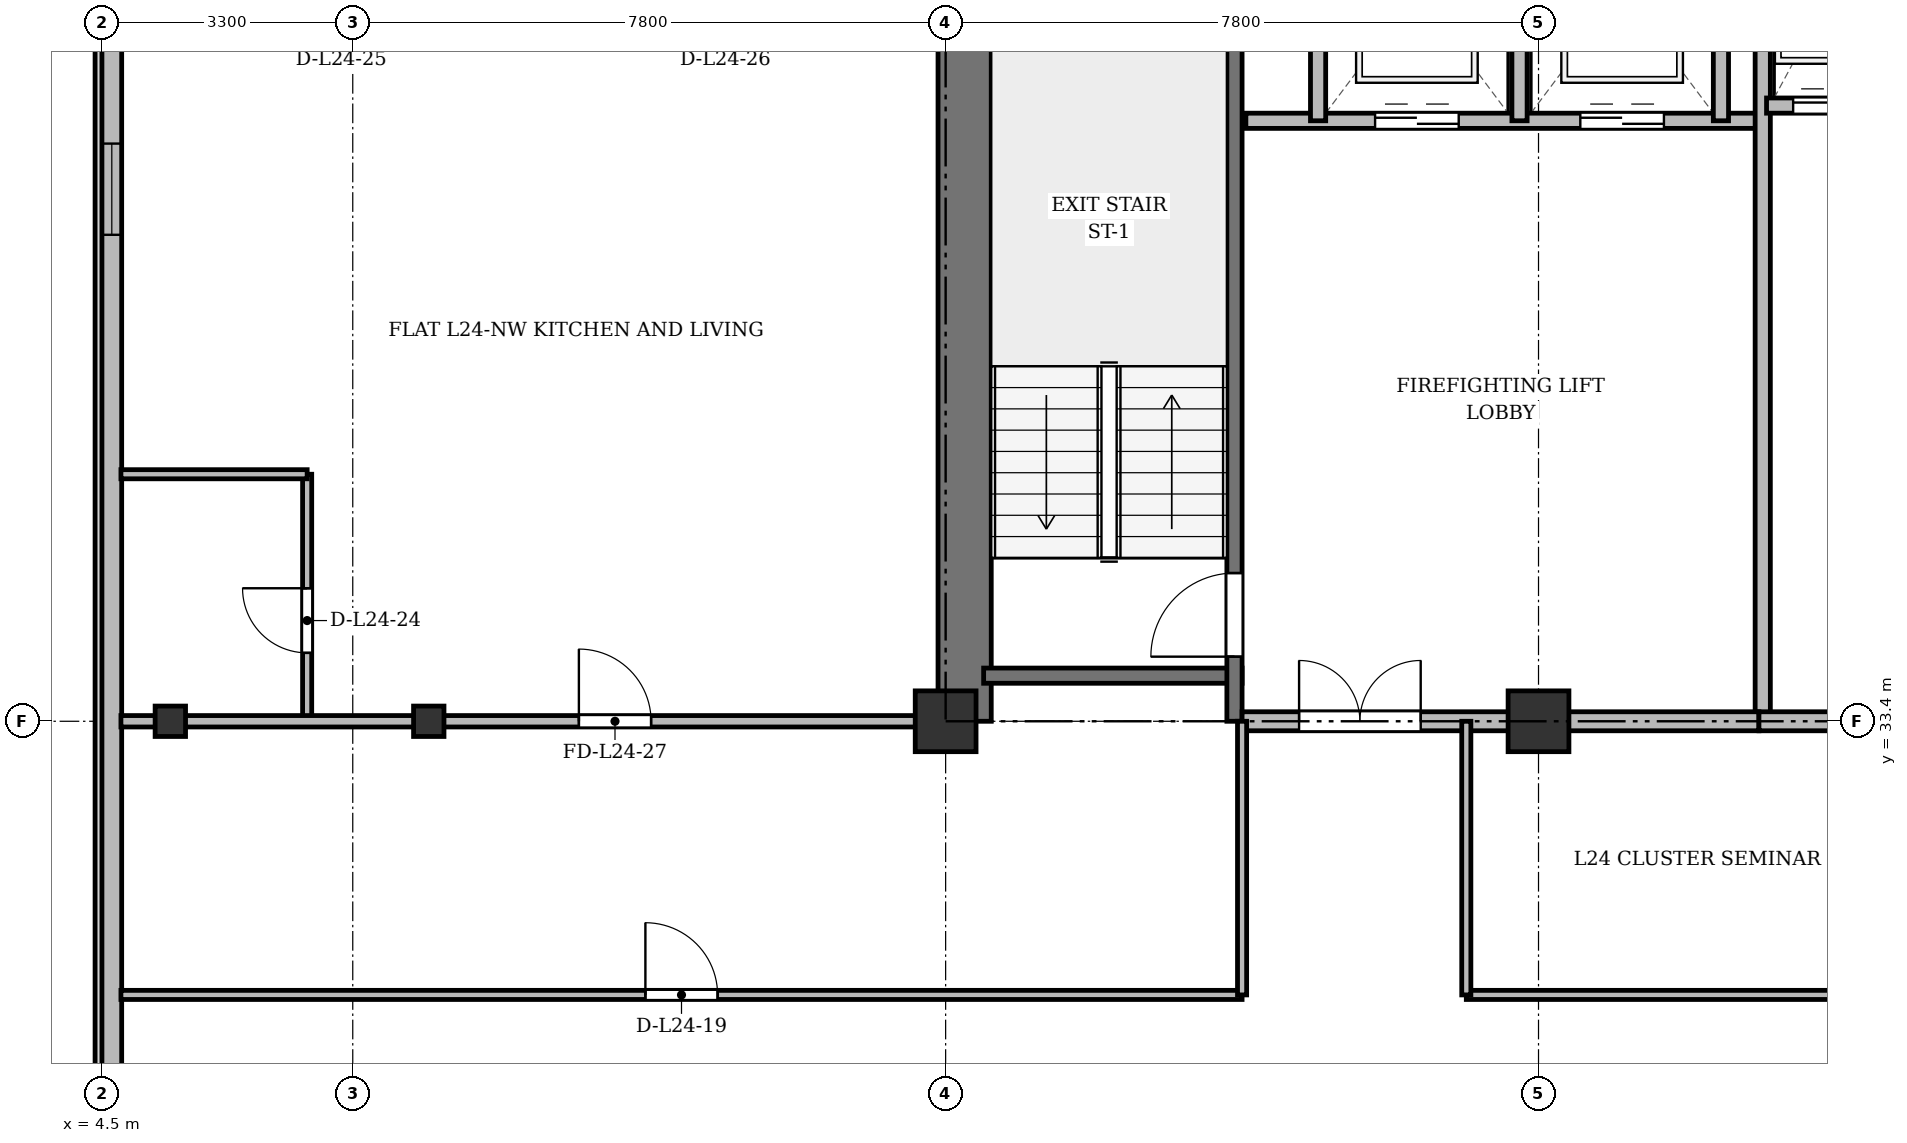
"""IFC4 building model, lengths in metres.
Left out: names, types, materials, properties, quantities, classifications, styles, units other than length and angle.
Written with IfcOpenShell. Run it as: python <this file> out.ifc"""

import sys

from ifc_helpers import new_model, si_unit, direction, frame, frame_2d, origin, origin_2d, place, context, subcontext, project, spatial, rectangle, i_section, extrude, source, transform, mapped, element, fill, save


model = new_model("IFC4")
c1 = context("Model", 3, precision=1e-05, world=origin(), true_north=direction((0.0, 1.0)))
c2 = subcontext(c1, "Body", "Model", "MODEL_VIEW")
j1 = project(units=[si_unit("LENGTHUNIT", "METRE"), si_unit("PLANEANGLEUNIT", "RADIAN")], contexts=[c1])
p1 = place(None, origin())
s1 = spatial("IfcSite", under=j1, at=p1, CompositionType="ELEMENT")
p2 = place(p1, origin())
s2 = spatial("IfcBuilding", under=s1, at=p2, CompositionType="ELEMENT")
p3 = place(p2, frame((0.0, 0.0, 96.1)))
s3 = spatial("IfcBuildingStorey", under=s2, at=p3, CompositionType="ELEMENT", Elevation=96.1)
m1 = source(origin(), c2, "Body", "SweptSolid", [
    extrude(i_section(OverallWidth=0.4, OverallDepth=0.4, WebThickness=0.022, FlangeThickness=0.035, at=origin_2d()), origin(), (0.0, 0.0, 1.0), 3.6),
])
for number, where, z_axis, x_axis in (
    (1, (5.4, 33.4, 0.0), (0.0, 0.0, 1.0), (1.0, 0.0, 0.0)),
    (2, (8.8, 33.4, 0.0), (0.0, 0.0, 1.0), (1.0, 0.0, 0.0)),
):
    element("IfcColumn", number, at=place(p3, frame(where, z_axis=z_axis, x_axis=x_axis)), inside=s3, PredefinedType="COLUMN", context=c2, shape_type="MappedRepresentation", body=[
        mapped(m1, transform((0.0, 0.0, 0.0), x_axis=(1.0, 0.0, 0.0), y_axis=(0.0, 1.0, 0.0), z_axis=(0.0, 0.0, 1.0), scale=1.0)),
    ])
m2 = source(origin(), c2, "Body", "SweptSolid", [
    extrude(rectangle(XDim=0.8, YDim=0.8, at=origin_2d()), origin(), (0.0, 0.0, 1.0), 3.6),
])
for number, where, z_axis, x_axis in (
    (3, (15.6, 33.4, 0.0), (0.0, 0.0, 1.0), (1.0, 0.0, 0.0)),
    (4, (23.4, 33.4, 0.0), (0.0, 0.0, 1.0), (1.0, 0.0, 0.0)),
):
    element("IfcColumn", number, at=place(p3, frame(where, z_axis=z_axis, x_axis=x_axis)), inside=s3, PredefinedType="COLUMN", context=c2, shape_type="MappedRepresentation", body=[
        mapped(m2, transform((0.0, 0.0, 0.0), x_axis=(1.0, 0.0, 0.0), y_axis=(0.0, 1.0, 0.0), z_axis=(0.0, 0.0, 1.0), scale=1.0)),
    ])
p4 = place(p3, frame((4.63, 5.9, 0.0), z_axis=(0.0, 0.0, 1.0), x_axis=(0.0, 1.0, 0.0)))
e5 = element("IfcWall", 5, at=p4, inside=s3, PredefinedType="SOLIDWALL", context=c2, shape_type="SweptSolid", body=[
    extrude(rectangle(XDim=39.6, YDim=0.26, at=frame_2d((19.8, 0.0))), origin(), (0.0, 0.0, 1.0), 3.34),
])
p5 = place(p4, frame((1.45, 0.0, 0.92)))
e6 = element("IfcOpeningElement", 6, at=p5, cuts=e5, PredefinedType="OPENING", context=c2, shape_type="SweptSolid", body=[
    extrude(rectangle(XDim=1.2, YDim=1.65, at=frame_2d((0.6, 0.825))), frame((0.0, 0.14, 0.0), z_axis=(0.0, -1.0, 0.0), x_axis=(1.0, 0.0, 0.0)), (0.0, 0.0, 1.0), 0.28),
])
p6 = place(p4, frame((4.2, 0.0, 0.92)))
e7 = element("IfcOpeningElement", 7, at=p6, cuts=e5, PredefinedType="OPENING", context=c2, shape_type="SweptSolid", body=[
    extrude(rectangle(XDim=2.6, YDim=1.9, at=frame_2d((1.3, 0.95))), frame((0.0, 0.14, 0.0), z_axis=(0.0, -1.0, 0.0), x_axis=(1.0, 0.0, 0.0)), (0.0, 0.0, 1.0), 0.28),
])
p7 = place(p4, frame((8.4, 0.0, 0.92)))
e8 = element("IfcOpeningElement", 8, at=p7, cuts=e5, PredefinedType="OPENING", context=c2, shape_type="SweptSolid", body=[
    extrude(rectangle(XDim=2.6, YDim=1.9, at=frame_2d((1.3, 0.95))), frame((0.0, 0.14, 0.0), z_axis=(0.0, -1.0, 0.0), x_axis=(1.0, 0.0, 0.0)), (0.0, 0.0, 1.0), 0.28),
])
p8 = place(p4, frame((33.9, 0.0, 0.92)))
e9 = element("IfcOpeningElement", 9, at=p8, cuts=e5, PredefinedType="OPENING", context=c2, shape_type="SweptSolid", body=[
    extrude(rectangle(XDim=1.2, YDim=1.65, at=frame_2d((0.6, 0.825))), frame((0.0, 0.14, 0.0), z_axis=(0.0, -1.0, 0.0), x_axis=(1.0, 0.0, 0.0)), (0.0, 0.0, 1.0), 0.28),
])
p9 = place(p4, frame((37.25, 0.0, 0.92)))
e10 = element("IfcOpeningElement", 10, at=p9, cuts=e5, PredefinedType="OPENING", context=c2, shape_type="SweptSolid", body=[
    extrude(rectangle(XDim=1.2, YDim=1.65, at=frame_2d((0.6, 0.825))), frame((0.0, 0.14, 0.0), z_axis=(0.0, -1.0, 0.0), x_axis=(1.0, 0.0, 0.0)), (0.0, 0.0, 1.0), 0.28),
])
p10 = place(p3, frame((15.85, 33.4, 0.0), z_axis=(0.0, 0.0, 1.0), x_axis=(0.0, 1.0, 0.0)))
e11 = element("IfcWall", 11, at=p10, inside=s3, PredefinedType="SHEAR", context=c2, shape_type="SweptSolid", body=[
    extrude(rectangle(XDim=11.7, YDim=0.7, at=frame_2d((5.85, 0.0))), origin(), (0.0, 0.0, 1.0), 3.34),
])
p11 = place(p3, frame((16.1, 34.0, 0.0), z_axis=(0.0, 0.0, 1.0), x_axis=(1.0, 0.0, 0.0)))
e12 = element("IfcWall", 12, at=p11, inside=s3, PredefinedType="SHEAR", context=c2, shape_type="SweptSolid", body=[
    extrude(rectangle(XDim=3.4, YDim=0.2, at=frame_2d((1.7, 0.0))), origin(), (0.0, 0.0, 1.0), 3.34),
])
p12 = place(p3, frame((19.4, 33.4, 0.0), z_axis=(0.0, 0.0, 1.0), x_axis=(0.0, 1.0, 0.0)))
e13 = element("IfcWall", 13, at=p12, inside=s3, PredefinedType="SHEAR", context=c2, shape_type="SweptSolid", body=[
    extrude(rectangle(XDim=11.1, YDim=0.2, at=frame_2d((5.55, 0.0))), origin(), (0.0, 0.0, 1.0), 3.34),
])
p13 = place(p12, frame((0.85, 0.0, 0.0)))
e14 = element("IfcOpeningElement", 14, at=p13, cuts=e13, PredefinedType="OPENING", context=c2, shape_type="SweptSolid", body=[
    extrude(rectangle(XDim=1.1, YDim=2.15, at=frame_2d((0.55, 1.075))), frame((0.0, 0.11, 0.0), z_axis=(0.0, -1.0, 0.0), x_axis=(1.0, 0.0, 0.0)), (0.0, 0.0, 1.0), 0.22),
])
p14 = place(p3, frame((19.55, 41.3, 0.0), z_axis=(0.0, 0.0, 1.0), x_axis=(1.0, 0.0, 0.0)))
e15 = element("IfcWall", 15, at=p14, inside=s3, PredefinedType="SOLIDWALL", context=c2, shape_type="SweptSolid", body=[
    extrude(rectangle(XDim=6.75, YDim=0.2, at=frame_2d((3.375, 0.0))), origin(), (0.0, 0.0, 1.0), 3.34),
])
p15 = place(p14, frame((1.7, 0.0, 0.0)))
e16 = element("IfcOpeningElement", 16, at=p15, cuts=e15, PredefinedType="OPENING", context=c2, shape_type="SweptSolid", body=[
    extrude(rectangle(XDim=1.1, YDim=2.15, at=frame_2d((0.55, 1.075))), frame((0.0, 0.11, 0.0), z_axis=(0.0, -1.0, 0.0), x_axis=(1.0, 0.0, 0.0)), (0.0, 0.0, 1.0), 0.22),
])
p16 = place(p14, frame((4.4, 0.0, 0.0)))
e17 = element("IfcOpeningElement", 17, at=p16, cuts=e15, PredefinedType="OPENING", context=c2, shape_type="SweptSolid", body=[
    extrude(rectangle(XDim=1.1, YDim=2.15, at=frame_2d((0.55, 1.075))), frame((0.0, 0.11, 0.0), z_axis=(0.0, -1.0, 0.0), x_axis=(1.0, 0.0, 0.0)), (0.0, 0.0, 1.0), 0.22),
])
for number, where, z_axis, x_axis in (
    (18, (20.5, 41.3, 0.0), (0.0, 0.0, 1.0), (0.0, 1.0, 0.0)),
    (19, (23.15, 41.3, 0.0), (0.0, 0.0, 1.0), (0.0, 1.0, 0.0)),
    (20, (25.8, 41.3, 0.0), (0.0, 0.0, 1.0), (0.0, 1.0, 0.0)),
):
    element("IfcWall", number, at=place(p3, frame(where, z_axis=z_axis, x_axis=x_axis)), inside=s3, PredefinedType="SOLIDWALL", context=c2, shape_type="SweptSolid", body=[
        extrude(rectangle(XDim=3.4, YDim=0.2, at=frame_2d((1.7, 0.0))), origin(), (0.0, 0.0, 1.0), 3.34),
    ])
p17 = place(p3, frame((26.35, 33.4, 0.0), z_axis=(0.0, 0.0, 1.0), x_axis=(0.0, 1.0, 0.0)))
e21 = element("IfcWall", 21, at=p17, inside=s3, PredefinedType="SOLIDWALL", context=c2, shape_type="SweptSolid", body=[
    extrude(rectangle(XDim=11.3, YDim=0.2, at=frame_2d((5.65, 0.0))), origin(), (0.0, 0.0, 1.0), 2.752),
])
p18 = place(p3, frame((19.5, 33.4, 0.0), z_axis=(0.0, 0.0, 1.0), x_axis=(1.0, 0.0, 0.0)))
e22 = element("IfcWall", 22, at=p18, inside=s3, PredefinedType="PARTITIONING", context=c2, shape_type="SweptSolid", body=[
    extrude(rectangle(XDim=6.8, YDim=0.25, at=frame_2d((3.4, 0.0))), origin(), (0.0, 0.0, 1.0), 2.752),
])
p19 = place(p18, frame((0.75, 0.0, 0.0)))
e23 = element("IfcOpeningElement", 23, at=p19, cuts=e22, PredefinedType="OPENING", context=c2, shape_type="SweptSolid", body=[
    extrude(rectangle(XDim=1.6, YDim=2.2, at=frame_2d((0.8, 1.1))), frame((0.0, 0.135, 0.0), z_axis=(0.0, -1.0, 0.0), x_axis=(1.0, 0.0, 0.0)), (0.0, 0.0, 1.0), 0.27),
])
p20 = place(p3, frame((26.4, 41.5, 0.0), z_axis=(0.0, 0.0, 1.0), x_axis=(1.0, 0.0, 0.0)))
e24 = element("IfcWall", 24, at=p20, inside=s3, PredefinedType="SOLIDWALL", context=c2, shape_type="SweptSolid", body=[
    extrude(rectangle(XDim=6.95, YDim=0.2, at=frame_2d((3.475, 0.0))), origin(), (0.0, 0.0, 1.0), 3.34),
])
p21 = place(p20, frame((0.35, 0.0, 0.0)))
e25 = element("IfcOpeningElement", 25, at=p21, cuts=e24, PredefinedType="OPENING", context=c2, shape_type="SweptSolid", body=[
    extrude(rectangle(XDim=1.05, YDim=2.15, at=frame_2d((0.525, 1.075))), frame((0.0, 0.11, 0.0), z_axis=(0.0, -1.0, 0.0), x_axis=(1.0, 0.0, 0.0)), (0.0, 0.0, 1.0), 0.22),
])
p22 = place(p20, frame((2.05, 0.0, 0.0)))
e26 = element("IfcOpeningElement", 26, at=p22, cuts=e24, PredefinedType="OPENING", context=c2, shape_type="SweptSolid", body=[
    extrude(rectangle(XDim=1.05, YDim=2.15, at=frame_2d((0.525, 1.075))), frame((0.0, 0.11, 0.0), z_axis=(0.0, -1.0, 0.0), x_axis=(1.0, 0.0, 0.0)), (0.0, 0.0, 1.0), 0.22),
])
p23 = place(p20, frame((3.75, 0.0, 0.0)))
e27 = element("IfcOpeningElement", 27, at=p23, cuts=e24, PredefinedType="OPENING", context=c2, shape_type="SweptSolid", body=[
    extrude(rectangle(XDim=1.05, YDim=2.15, at=frame_2d((0.525, 1.075))), frame((0.0, 0.11, 0.0), z_axis=(0.0, -1.0, 0.0), x_axis=(1.0, 0.0, 0.0)), (0.0, 0.0, 1.0), 0.22),
])
p24 = place(p20, frame((5.45, 0.0, 0.0)))
e28 = element("IfcOpeningElement", 28, at=p24, cuts=e24, PredefinedType="OPENING", context=c2, shape_type="SweptSolid", body=[
    extrude(rectangle(XDim=1.05, YDim=2.15, at=frame_2d((0.525, 1.075))), frame((0.0, 0.11, 0.0), z_axis=(0.0, -1.0, 0.0), x_axis=(1.0, 0.0, 0.0)), (0.0, 0.0, 1.0), 0.22),
])
p25 = place(p3, frame((26.3, 33.4, 0.0), z_axis=(0.0, 0.0, 1.0), x_axis=(1.0, 0.0, 0.0)))
e29 = element("IfcWall", 29, at=p25, inside=s3, PredefinedType="PARTITIONING", context=c2, shape_type="SweptSolid", body=[
    extrude(rectangle(XDim=20.85, YDim=0.25, at=frame_2d((10.425, 0.0))), origin(), (0.0, 0.0, 1.0), 2.752),
])
p26 = place(p25, frame((9.2, 0.0, 0.0)))
e30 = element("IfcOpeningElement", 30, at=p26, cuts=e29, PredefinedType="OPENING", context=c2, shape_type="SweptSolid", body=[
    extrude(rectangle(XDim=1.6, YDim=2.2, at=frame_2d((0.8, 1.1))), frame((0.0, 0.135, 0.0), z_axis=(0.0, -1.0, 0.0), x_axis=(1.0, 0.0, 0.0)), (0.0, 0.0, 1.0), 0.27),
])
p27 = place(p3, frame((4.75, 29.8, 0.0), z_axis=(0.0, 0.0, 1.0), x_axis=(1.0, 0.0, 0.0)))
e31 = element("IfcWall", 31, at=p27, inside=s3, PredefinedType="PARTITIONING", context=c2, shape_type="SweptSolid", body=[
    extrude(rectangle(XDim=14.75, YDim=0.12, at=frame_2d((7.375, 0.0))), origin(), (0.0, 0.0, 1.0), 2.84),
])
p28 = place(p27, frame((6.9, 0.0, 0.0)))
e32 = element("IfcOpeningElement", 32, at=p28, cuts=e31, PredefinedType="OPENING", context=c2, shape_type="SweptSolid", body=[
    extrude(rectangle(XDim=0.95, YDim=2.15, at=frame_2d((0.475, 1.075))), frame((0.0, 0.07, 0.0), z_axis=(0.0, -1.0, 0.0), x_axis=(1.0, 0.0, 0.0)), (0.0, 0.0, 1.0), 0.14),
])
p29 = place(p3, frame((22.45, 29.8, 0.0), z_axis=(0.0, 0.0, 1.0), x_axis=(1.0, 0.0, 0.0)))
e33 = element("IfcWall", 33, at=p29, inside=s3, PredefinedType="PARTITIONING", context=c2, shape_type="SweptSolid", body=[
    extrude(rectangle(XDim=11.75, YDim=0.12, at=frame_2d((5.875, 0.0))), origin(), (0.0, 0.0, 1.0), 2.84),
])
p30 = place(p29, frame((4.944, 0.0, 0.0)))
e34 = element("IfcOpeningElement", 34, at=p30, cuts=e33, PredefinedType="OPENING", context=c2, shape_type="SweptSolid", body=[
    extrude(rectangle(XDim=0.95, YDim=2.15, at=frame_2d((0.475, 1.075))), frame((0.0, 0.07, 0.0), z_axis=(0.0, -1.0, 0.0), x_axis=(1.0, 0.0, 0.0)), (0.0, 0.0, 1.0), 0.14),
])
for number, where, z_axis, x_axis in (
    (35, (19.5, 29.8, 0.0), (0.0, 0.0, 1.0), (0.0, 1.0, 0.0)),
    (36, (22.45, 29.8, 0.0), (0.0, 0.0, 1.0), (0.0, 1.0, 0.0)),
):
    element("IfcWall", number, at=place(p3, frame(where, z_axis=z_axis, x_axis=x_axis)), inside=s3, PredefinedType="PARTITIONING", context=c2, shape_type="SweptSolid", body=[
        extrude(rectangle(XDim=3.6, YDim=0.12, at=frame_2d((1.8, 0.0))), origin(), (0.0, 0.0, 1.0), 2.752),
    ])
p31 = place(p3, frame((7.2, 33.4, 0.0), z_axis=(0.0, 0.0, 1.0), x_axis=(0.0, 1.0, 0.0)))
e37 = element("IfcWall", 37, at=p31, inside=s3, PredefinedType="PARTITIONING", context=c2, shape_type="SweptSolid", body=[
    extrude(rectangle(XDim=3.25, YDim=0.12, at=frame_2d((1.625, 0.0))), origin(), (0.0, 0.0, 1.0), 2.752),
])
p32 = place(p31, frame((0.9, 0.0, 0.0)))
e38 = element("IfcOpeningElement", 38, at=p32, cuts=e37, PredefinedType="OPENING", context=c2, shape_type="SweptSolid", body=[
    extrude(rectangle(XDim=0.85, YDim=2.1, at=frame_2d((0.425, 1.05))), frame((0.0, 0.07, 0.0), z_axis=(0.0, -1.0, 0.0), x_axis=(1.0, 0.0, 0.0)), (0.0, 0.0, 1.0), 0.14),
])
p33 = place(p3, frame((4.75, 36.65, 0.0), z_axis=(0.0, 0.0, 1.0), x_axis=(1.0, 0.0, 0.0)))
e39 = element("IfcWall", 39, at=p33, inside=s3, PredefinedType="PARTITIONING", context=c2, shape_type="SweptSolid", body=[
    extrude(rectangle(XDim=2.45, YDim=0.12, at=frame_2d((1.225, 0.0))), origin(), (0.0, 0.0, 1.0), 2.84),
])
p34 = place(p3, frame((4.75, 33.4, 0.0), z_axis=(0.0, 0.0, 1.0), x_axis=(1.0, 0.0, 0.0)))
e40 = element("IfcWall", 40, at=p34, inside=s3, PredefinedType="PARTITIONING", context=c2, shape_type="SweptSolid", body=[
    extrude(rectangle(XDim=10.85, YDim=0.15, at=frame_2d((5.425, 0.0))), origin(), (0.0, 0.0, 1.0), 2.752),
])
p35 = place(p34, frame((6.025, 0.0, 0.0)))
e41 = element("IfcOpeningElement", 41, at=p35, cuts=e40, PredefinedType="OPENING", context=c2, shape_type="SweptSolid", body=[
    extrude(rectangle(XDim=0.95, YDim=2.15, at=frame_2d((0.475, 1.075))), frame((0.0, 0.085, 0.0), z_axis=(0.0, -1.0, 0.0), x_axis=(1.0, 0.0, 0.0)), (0.0, 0.0, 1.0), 0.17),
])
m3 = source(origin(), c2, "Body", "SweptSolid", [
    extrude(rectangle(XDim=1.2, YDim=1.65, at=frame_2d((0.6, 0.825))), frame((0.0, 0.03, 0.0), z_axis=(0.0, -1.0, 0.0), x_axis=(1.0, 0.0, 0.0)), (0.0, 0.0, 1.0), 0.06),
])
p36 = place(p8, origin())
e42 = element("IfcWindow", 42, at=p36, inside=s3, PartitioningType="SINGLE_PANEL", PredefinedType="WINDOW", context=c2, shape_type="MappedRepresentation", body=[
    mapped(m3, transform((0.0, 0.0, 0.0), x_axis=(1.0, 0.0, 0.0), y_axis=(0.0, 1.0, 0.0), z_axis=(0.0, 0.0, 1.0), scale=1.0)),
])
fill(e9, e42)
m4 = source(origin(), c2, "Body", "SweptSolid", [
    extrude(rectangle(XDim=1.1, YDim=2.15, at=frame_2d((0.55, 1.075))), frame((0.0, 0.025, 0.0), z_axis=(0.0, -1.0, 0.0), x_axis=(1.0, 0.0, 0.0)), (0.0, 0.0, 1.0), 0.05),
])
p37 = place(p13, origin())
e43 = element("IfcDoor", 43, at=p37, inside=s3, OperationType="SINGLE_SWING_LEFT", PredefinedType="DOOR", context=c2, shape_type="MappedRepresentation", body=[
    mapped(m4, transform((0.0, 0.0, 0.0), x_axis=(1.0, 0.0, 0.0), y_axis=(0.0, 1.0, 0.0), z_axis=(0.0, 0.0, 1.0), scale=1.0)),
])
fill(e14, e43)
p38 = place(p15, origin())
e44 = element("IfcDoor", 44, at=p38, inside=s3, OperationType="DOUBLE_DOOR_SLIDING", PredefinedType="DOOR", context=c2, shape_type="MappedRepresentation", body=[
    mapped(m4, transform((0.0, 0.0, 0.0), x_axis=(1.0, 0.0, 0.0), y_axis=(0.0, 1.0, 0.0), z_axis=(0.0, 0.0, 1.0), scale=1.0)),
])
fill(e16, e44)
p39 = place(p16, origin())
e45 = element("IfcDoor", 45, at=p39, inside=s3, OperationType="DOUBLE_DOOR_SLIDING", PredefinedType="DOOR", context=c2, shape_type="MappedRepresentation", body=[
    mapped(m4, transform((0.0, 0.0, 0.0), x_axis=(1.0, 0.0, 0.0), y_axis=(0.0, 1.0, 0.0), z_axis=(0.0, 0.0, 1.0), scale=1.0)),
])
fill(e17, e45)
m5 = source(origin(), c2, "Body", "SweptSolid", [
    extrude(rectangle(XDim=1.6, YDim=2.2, at=frame_2d((0.8, 1.1))), frame((0.0, 0.025, 0.0), z_axis=(0.0, -1.0, 0.0), x_axis=(1.0, 0.0, 0.0)), (0.0, 0.0, 1.0), 0.05),
])
p40 = place(p19, origin())
e46 = element("IfcDoor", 46, at=p40, inside=s3, OperationType="DOUBLE_DOOR_SINGLE_SWING", PredefinedType="DOOR", context=c2, shape_type="MappedRepresentation", body=[
    mapped(m5, transform((0.0, 0.0, 0.0), x_axis=(1.0, 0.0, 0.0), y_axis=(0.0, 1.0, 0.0), z_axis=(0.0, 0.0, 1.0), scale=1.0)),
])
fill(e23, e46)
m6 = source(origin(), c2, "Body", "SweptSolid", [
    extrude(rectangle(XDim=1.05, YDim=2.15, at=frame_2d((0.525, 1.075))), frame((0.0, 0.025, 0.0), z_axis=(0.0, -1.0, 0.0), x_axis=(1.0, 0.0, 0.0)), (0.0, 0.0, 1.0), 0.05),
])
p41 = place(p21, origin())
e47 = element("IfcDoor", 47, at=p41, inside=s3, OperationType="DOUBLE_DOOR_SLIDING", PredefinedType="DOOR", context=c2, shape_type="MappedRepresentation", body=[
    mapped(m6, transform((0.0, 0.0, 0.0), x_axis=(1.0, 0.0, 0.0), y_axis=(0.0, 1.0, 0.0), z_axis=(0.0, 0.0, 1.0), scale=1.0)),
])
fill(e25, e47)
m7 = source(origin(), c2, "Body", "SweptSolid", [
    extrude(rectangle(XDim=0.95, YDim=2.15, at=frame_2d((0.475, 1.075))), frame((0.0, 0.025, 0.0), z_axis=(0.0, -1.0, 0.0), x_axis=(1.0, 0.0, 0.0)), (0.0, 0.0, 1.0), 0.05),
])
p42 = place(p28, origin())
e48 = element("IfcDoor", 48, at=p42, inside=s3, OperationType="SINGLE_SWING_LEFT", PredefinedType="DOOR", context=c2, shape_type="MappedRepresentation", body=[
    mapped(m7, transform((0.0, 0.0, 0.0), x_axis=(1.0, 0.0, 0.0), y_axis=(0.0, 1.0, 0.0), z_axis=(0.0, 0.0, 1.0), scale=1.0)),
])
fill(e32, e48)
m8 = source(origin(), c2, "Body", "SweptSolid", [
    extrude(rectangle(XDim=0.85, YDim=2.1, at=frame_2d((0.425, 1.05))), frame((0.0, 0.025, 0.0), z_axis=(0.0, -1.0, 0.0), x_axis=(1.0, 0.0, 0.0)), (0.0, 0.0, 1.0), 0.05),
])
p43 = place(p32, origin())
e49 = element("IfcDoor", 49, at=p43, inside=s3, OperationType="SINGLE_SWING_RIGHT", PredefinedType="DOOR", context=c2, shape_type="MappedRepresentation", body=[
    mapped(m8, transform((0.0, 0.0, 0.0), x_axis=(1.0, 0.0, 0.0), y_axis=(0.0, 1.0, 0.0), z_axis=(0.0, 0.0, 1.0), scale=1.0)),
])
fill(e38, e49)
p44 = place(p35, origin())
e50 = element("IfcDoor", 50, at=p44, inside=s3, OperationType="SINGLE_SWING_LEFT", PredefinedType="DOOR", context=c2, shape_type="MappedRepresentation", body=[
    mapped(m7, transform((0.0, 0.0, 0.0), x_axis=(1.0, 0.0, 0.0), y_axis=(0.0, 1.0, 0.0), z_axis=(0.0, 0.0, 1.0), scale=1.0)),
])
fill(e41, e50)
save(model, sys.argv[1])
